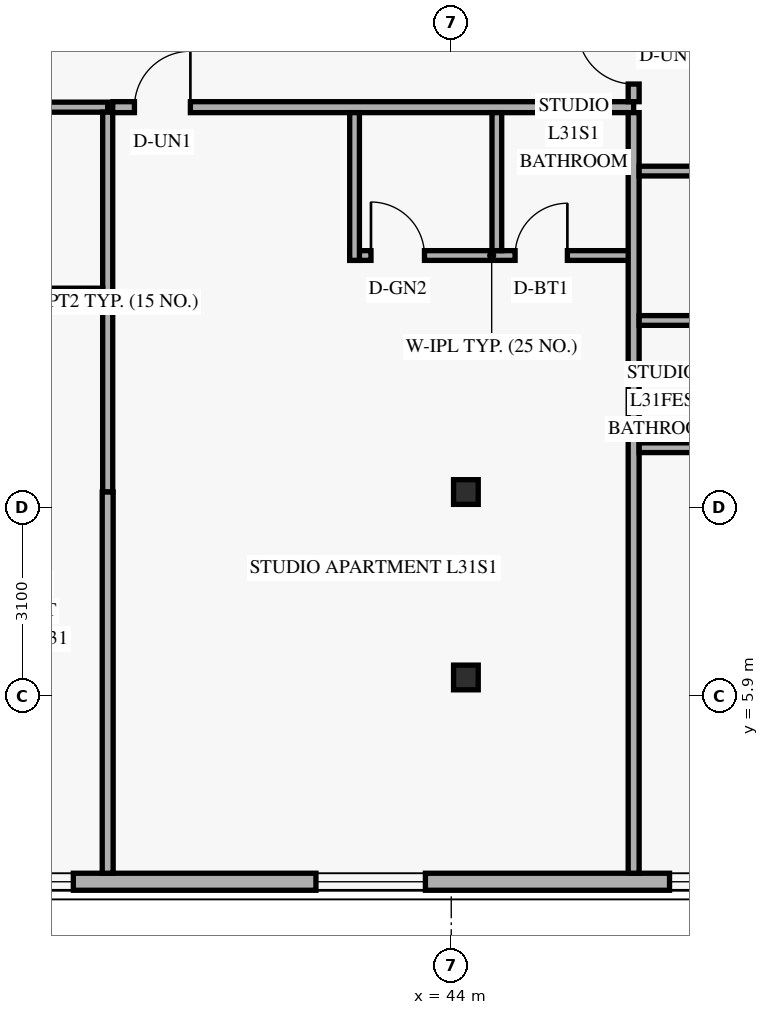
"""IFC4 building model, lengths in metres.
Left out: names, types, materials, properties, quantities, classifications, styles, units other than length and angle.
Written with IfcOpenShell. Run it as: python <this file> out.ifc"""

import sys

from ifc_helpers import new_model, si_unit, direction, frame, frame_2d, origin, origin_2d, place, context, subcontext, project, spatial, rectangle, hollow_rectangle, extrude, element, fill, save


model = new_model("IFC4")
c1 = context("Model", 3, precision=1e-05, world=origin(), true_north=direction((0.0, 1.0)))
c2 = subcontext(c1, "Body", "Model", "MODEL_VIEW")
j1 = project(units=[si_unit("LENGTHUNIT", "METRE"), si_unit("PLANEANGLEUNIT", "RADIAN")], contexts=[c1])
p1 = place(None, origin())
s1 = spatial("IfcSite", under=j1, at=p1, CompositionType="ELEMENT")
p2 = place(p1, origin())
s2 = spatial("IfcBuilding", under=s1, at=p2, CompositionType="ELEMENT")
p3 = place(p2, frame((0.0, 0.0, 121.2)))
s3 = spatial("IfcBuildingStorey", under=s2, at=p3, CompositionType="ELEMENT", Elevation=121.2)
for number, where, z_axis, x_axis in (
    (1, (44.178, 6.2, 0.0), (0.035, 0.0, 0.999), (0.0, 1.0, 0.0)),
    (2, (44.178, 9.25, 0.0), (0.035, 0.0, 0.999), (0.0, 1.0, 0.0)),
):
    element("IfcColumn", number, at=place(p3, frame(where, z_axis=z_axis, x_axis=x_axis)), inside=s3, PredefinedType="COLUMN", context=c2, shape_type="SweptSolid", body=[
        extrude(hollow_rectangle(XDim=0.406, YDim=0.406, WallThickness=0.016, at=origin_2d()), origin(), (0.0, 0.0, 1.0), 3.602),
    ])
p4 = place(p3, frame((13.42, 2.84, 0.0), z_axis=(0.0, 0.0, 1.0), x_axis=(1.0, 0.0, 0.0)))
e3 = element("IfcWall", 3, at=p4, inside=s3, PredefinedType="SOLIDWALL", context=c2, shape_type="SweptSolid", body=[
    extrude(rectangle(XDim=36.56, YDim=0.28, at=frame_2d((18.28, 0.0))), origin(), (0.0, 0.0, 1.0), 3.36),
])
p5 = place(p4, frame((3.215, 0.0, 0.85)))
e4 = element("IfcOpeningElement", 4, at=p5, cuts=e3, PredefinedType="OPENING", context=c2, shape_type="SweptSolid", body=[
    extrude(rectangle(XDim=1.8, YDim=1.6, at=frame_2d((0.9, 0.8))), frame((0.0, 0.15, 0.0), z_axis=(0.0, -1.0, 0.0), x_axis=(1.0, 0.0, 0.0)), (0.0, 0.0, 1.0), 0.3),
])
p6 = place(p4, frame((10.405, 0.0, 0.85)))
e5 = element("IfcOpeningElement", 5, at=p6, cuts=e3, PredefinedType="OPENING", context=c2, shape_type="SweptSolid", body=[
    extrude(rectangle(XDim=1.8, YDim=1.6, at=frame_2d((0.9, 0.8))), frame((0.0, 0.15, 0.0), z_axis=(0.0, -1.0, 0.0), x_axis=(1.0, 0.0, 0.0)), (0.0, 0.0, 1.0), 0.3),
])
p7 = place(p4, frame((17.29, 0.0, 0.85)))
e6 = element("IfcOpeningElement", 6, at=p7, cuts=e3, PredefinedType="OPENING", context=c2, shape_type="SweptSolid", body=[
    extrude(rectangle(XDim=1.8, YDim=1.6, at=frame_2d((0.9, 0.8))), frame((0.0, 0.15, 0.0), z_axis=(0.0, -1.0, 0.0), x_axis=(1.0, 0.0, 0.0)), (0.0, 0.0, 1.0), 0.3),
])
p8 = place(p4, frame((22.565, 0.0, 0.85)))
e7 = element("IfcOpeningElement", 7, at=p8, cuts=e3, PredefinedType="OPENING", context=c2, shape_type="SweptSolid", body=[
    extrude(rectangle(XDim=1.8, YDim=1.6, at=frame_2d((0.9, 0.8))), frame((0.0, 0.15, 0.0), z_axis=(0.0, -1.0, 0.0), x_axis=(1.0, 0.0, 0.0)), (0.0, 0.0, 1.0), 0.3),
])
p9 = place(p4, frame((28.355, 0.0, 0.85)))
e8 = element("IfcOpeningElement", 8, at=p9, cuts=e3, PredefinedType="OPENING", context=c2, shape_type="SweptSolid", body=[
    extrude(rectangle(XDim=1.8, YDim=1.6, at=frame_2d((0.9, 0.8))), frame((0.0, 0.15, 0.0), z_axis=(0.0, -1.0, 0.0), x_axis=(1.0, 0.0, 0.0)), (0.0, 0.0, 1.0), 0.3),
])
p10 = place(p4, frame((34.17, 0.0, 0.85)))
e9 = element("IfcOpeningElement", 9, at=p10, cuts=e3, PredefinedType="OPENING", context=c2, shape_type="SweptSolid", body=[
    extrude(rectangle(XDim=1.8, YDim=1.6, at=frame_2d((0.9, 0.8))), frame((0.0, 0.15, 0.0), z_axis=(0.0, -1.0, 0.0), x_axis=(1.0, 0.0, 0.0)), (0.0, 0.0, 1.0), 0.3),
])
p11 = place(p3, frame((32.732, 15.58, 0.0), z_axis=(0.0, 0.0, 1.0), x_axis=(1.0, 0.0, 0.0)))
e10 = element("IfcWall", 10, at=p11, inside=s3, PredefinedType="PARTITIONING", context=c2, shape_type="SweptSolid", body=[
    extrude(rectangle(XDim=5.618, YDim=0.165, at=frame_2d((2.809, 0.0))), origin(), (0.0, 0.0, 1.0), 2.731),
])
p12 = place(p11, frame((2.867, 0.0, 0.0)))
e11 = element("IfcOpeningElement", 11, at=p12, cuts=e10, PredefinedType="OPENING", context=c2, shape_type="SweptSolid", body=[
    extrude(rectangle(XDim=0.95, YDim=2.15, at=frame_2d((0.475, 1.075))), frame((0.0, 0.093, 0.0), z_axis=(0.0, -1.0, 0.0), x_axis=(1.0, 0.0, 0.0)), (0.0, 0.0, 1.0), 0.185),
])
p13 = place(p3, frame((38.35, 9.25, 0.0), z_axis=(0.0, 0.0, 1.0), x_axis=(0.0, 1.0, 0.0)))
e12 = element("IfcWall", 12, at=p13, inside=s3, PredefinedType="PARTITIONING", context=c2, shape_type="SweptSolid", body=[
    extrude(rectangle(XDim=6.248, YDim=0.165, at=frame_2d((3.124, 0.0))), origin(), (0.0, 0.0, 1.0), 2.731),
])
p14 = place(p3, frame((32.732, 12.52, 0.0), z_axis=(0.0, 0.0, 1.0), x_axis=(1.0, 0.0, 0.0)))
e13 = element("IfcWall", 13, at=p14, inside=s3, PredefinedType="PARTITIONING", context=c2, shape_type="SweptSolid", body=[
    extrude(rectangle(XDim=5.535, YDim=0.165, at=frame_2d((2.768, 0.0))), origin(), (0.0, 0.0, 1.0), 2.731),
])
p15 = place(p14, frame((2.768, 0.0, 0.0)))
e14 = element("IfcOpeningElement", 14, at=p15, cuts=e13, PredefinedType="OPENING", context=c2, shape_type="SweptSolid", body=[
    extrude(rectangle(XDim=0.9, YDim=2.1, at=frame_2d((0.45, 1.05))), frame((0.0, 0.093, 0.0), z_axis=(0.0, -1.0, 0.0), x_axis=(1.0, 0.0, 0.0)), (0.0, 0.0, 1.0), 0.185),
])
p16 = place(p3, frame((38.433, 15.58, 0.0), z_axis=(0.0, 0.0, 1.0), x_axis=(1.0, 0.0, 0.0)))
e15 = element("IfcWall", 15, at=p16, inside=s3, PredefinedType="STANDARD", context=c2, shape_type="SweptSolid", body=[
    extrude(rectangle(XDim=8.567, YDim=0.18, at=frame_2d((4.284, 0.0))), origin(), (0.0, 0.0, 1.0), 2.731),
])
p17 = place(p16, frame((0.357, 0.0, 0.0)))
e16 = element("IfcOpeningElement", 16, at=p17, cuts=e15, PredefinedType="OPENING", context=c2, shape_type="SweptSolid", body=[
    extrude(rectangle(XDim=0.92, YDim=2.15, at=frame_2d((0.46, 1.075))), frame((0.0, 0.1, 0.0), z_axis=(0.0, -1.0, 0.0), x_axis=(1.0, 0.0, 0.0)), (0.0, 0.0, 1.0), 0.2),
])
p18 = place(p3, frame((38.35, 2.98, 0.0), z_axis=(0.0, 0.0, 1.0), x_axis=(0.0, 1.0, 0.0)))
e17 = element("IfcWall", 17, at=p18, inside=s3, PredefinedType="PARTITIONING", context=c2, shape_type="SweptSolid", body=[
    extrude(rectangle(XDim=6.27, YDim=0.18, at=frame_2d((3.135, 0.0))), origin(), (0.0, 0.0, 1.0), 2.731),
])
p19 = place(p3, frame((42.33, 13.14, 0.0), z_axis=(0.0, 0.0, 1.0), x_axis=(1.0, 0.0, 0.0)))
e18 = element("IfcWall", 18, at=p19, inside=s3, PredefinedType="PLUMBINGWALL", context=c2, shape_type="SweptSolid", body=[
    extrude(rectangle(XDim=4.67, YDim=0.16, at=frame_2d((2.335, 0.0))), origin(), (0.0, 0.0, 1.0), 2.731),
])
p20 = place(p19, frame((0.35, 0.0, 0.0)))
e19 = element("IfcOpeningElement", 19, at=p20, cuts=e18, PredefinedType="OPENING", context=c2, shape_type="SweptSolid", body=[
    extrude(rectangle(XDim=0.88, YDim=2.12, at=frame_2d((0.44, 1.06))), frame((0.0, 0.09, 0.0), z_axis=(0.0, -1.0, 0.0), x_axis=(1.0, 0.0, 0.0)), (0.0, 0.0, 1.0), 0.18),
])
p21 = place(p19, frame((2.72, 0.0, 0.0)))
e20 = element("IfcOpeningElement", 20, at=p21, cuts=e18, PredefinedType="OPENING", context=c2, shape_type="SweptSolid", body=[
    extrude(rectangle(XDim=0.86, YDim=2.12, at=frame_2d((0.43, 1.06))), frame((0.0, 0.09, 0.0), z_axis=(0.0, -1.0, 0.0), x_axis=(1.0, 0.0, 0.0)), (0.0, 0.0, 1.0), 0.18),
])
p22 = place(p3, frame((42.41, 13.06, 0.0), z_axis=(0.0, 0.0, 1.0), x_axis=(0.0, 1.0, 0.0)))
e21 = element("IfcWall", 21, at=p22, inside=s3, PredefinedType="PLUMBINGWALL", context=c2, shape_type="SweptSolid", body=[
    extrude(rectangle(XDim=2.43, YDim=0.16, at=frame_2d((1.215, 0.0))), origin(), (0.0, 0.0, 1.0), 2.988),
])
p23 = place(p3, frame((44.75, 13.22, 0.0), z_axis=(0.0, 0.0, 1.0), x_axis=(0.0, 1.0, 0.0)))
e22 = element("IfcWall", 22, at=p23, inside=s3, PredefinedType="PLUMBINGWALL", context=c2, shape_type="SweptSolid", body=[
    extrude(rectangle(XDim=2.27, YDim=0.16, at=frame_2d((1.135, 0.0))), origin(), (0.0, 0.0, 1.0), 2.988),
])
p24 = place(p3, frame((47.0, 15.67, 0.0), z_axis=(0.0, 0.0, 1.0), x_axis=(0.0, 1.0, 0.0)))
e23 = element("IfcWall", 23, at=p24, inside=s3, PredefinedType="STANDARD", context=c2, shape_type="SweptSolid", body=[
    extrude(rectangle(XDim=1.52, YDim=0.18, at=frame_2d((0.76, 0.0))), origin(), (0.0, 0.0, 1.0), 3.36),
])
p25 = place(p24, frame((0.29, 0.0, 0.0)))
e24 = element("IfcOpeningElement", 24, at=p25, cuts=e23, PredefinedType="OPENING", context=c2, shape_type="SweptSolid", body=[
    extrude(rectangle(XDim=0.92, YDim=2.15, at=frame_2d((0.46, 1.075))), frame((0.0, 0.1, 0.0), z_axis=(0.0, -1.0, 0.0), x_axis=(1.0, 0.0, 0.0)), (0.0, 0.0, 1.0), 0.2),
])
p26 = place(p3, frame((47.0, 2.98, 0.0), z_axis=(0.0, 0.0, 1.0), x_axis=(0.0, 1.0, 0.0)))
e25 = element("IfcWall", 25, at=p26, inside=s3, PredefinedType="PARTITIONING", context=c2, shape_type="SweptSolid", body=[
    extrude(rectangle(XDim=12.51, YDim=0.18, at=frame_2d((6.255, 0.0))), origin(), (0.0, 0.0, 1.0), 2.731),
])
for number, where, z_axis, x_axis in (
    (26, (47.09, 9.979, 0.0), (0.0, 0.0, 1.0), (1.0, 0.0, 0.0)),
    (27, (47.09, 14.529, 0.0), (0.0, 0.0, 1.0), (1.0, 0.0, 0.0)),
):
    element("IfcWall", number, at=place(p3, frame(where, z_axis=z_axis, x_axis=x_axis)), inside=s3, PredefinedType="PLUMBINGWALL", context=c2, shape_type="SweptSolid", body=[
        extrude(rectangle(XDim=2.53, YDim=0.16, at=frame_2d((1.265, 0.0))), origin(), (0.0, 0.0, 1.0), 3.36),
    ])
p27 = place(p3, frame((47.09, 12.072, 0.0), z_axis=(0.0, 0.0, 1.0), x_axis=(1.0, 0.0, 0.0)))
e28 = element("IfcWall", 28, at=p27, inside=s3, PredefinedType="PLUMBINGWALL", context=c2, shape_type="SweptSolid", body=[
    extrude(rectangle(XDim=2.37, YDim=0.16, at=frame_2d((1.185, 0.0))), origin(), (0.0, 0.0, 1.0), 3.36),
])
p28 = place(p8, origin())
e29 = element("IfcWindow", 29, at=p28, inside=s3, PartitioningType="SINGLE_PANEL", PredefinedType="WINDOW", context=c2, shape_type="SweptSolid", body=[
    extrude(rectangle(XDim=1.8, YDim=1.6, at=frame_2d((0.9, 0.8))), frame((0.0, 0.03, 0.0), z_axis=(0.0, -1.0, 0.0), x_axis=(1.0, 0.0, 0.0)), (0.0, 0.0, 1.0), 0.06),
])
fill(e7, e29)
p29 = place(p9, origin())
e30 = element("IfcWindow", 30, at=p29, inside=s3, PartitioningType="SINGLE_PANEL", PredefinedType="WINDOW", context=c2, shape_type="SweptSolid", body=[
    extrude(rectangle(XDim=1.8, YDim=1.6, at=frame_2d((0.9, 0.8))), frame((0.0, 0.03, 0.0), z_axis=(0.0, -1.0, 0.0), x_axis=(1.0, 0.0, 0.0)), (0.0, 0.0, 1.0), 0.06),
])
fill(e8, e30)
p30 = place(p10, origin())
e31 = element("IfcWindow", 31, at=p30, inside=s3, PartitioningType="SINGLE_PANEL", PredefinedType="WINDOW", context=c2, shape_type="SweptSolid", body=[
    extrude(rectangle(XDim=1.8, YDim=1.6, at=frame_2d((0.9, 0.8))), frame((0.0, 0.03, 0.0), z_axis=(0.0, -1.0, 0.0), x_axis=(1.0, 0.0, 0.0)), (0.0, 0.0, 1.0), 0.06),
])
fill(e9, e31)
p31 = place(p17, origin())
e32 = element("IfcDoor", 32, at=p31, inside=s3, OperationType="SINGLE_SWING_RIGHT", PredefinedType="DOOR", context=c2, shape_type="SweptSolid", body=[
    extrude(rectangle(XDim=0.92, YDim=2.15, at=frame_2d((0.46, 1.075))), frame((0.0, 0.025, 0.0), z_axis=(0.0, -1.0, 0.0), x_axis=(1.0, 0.0, 0.0)), (0.0, 0.0, 1.0), 0.05),
])
fill(e16, e32)
p32 = place(p20, origin())
e33 = element("IfcDoor", 33, at=p32, inside=s3, OperationType="SINGLE_SWING_LEFT", PredefinedType="DOOR", context=c2, shape_type="SweptSolid", body=[
    extrude(rectangle(XDim=0.88, YDim=2.12, at=frame_2d((0.44, 1.06))), frame((0.0, 0.025, 0.0), z_axis=(0.0, -1.0, 0.0), x_axis=(1.0, 0.0, 0.0)), (0.0, 0.0, 1.0), 0.05),
])
fill(e19, e33)
p33 = place(p21, origin())
e34 = element("IfcDoor", 34, at=p33, inside=s3, OperationType="SINGLE_SWING_RIGHT", PredefinedType="DOOR", context=c2, shape_type="SweptSolid", body=[
    extrude(rectangle(XDim=0.86, YDim=2.12, at=frame_2d((0.43, 1.06))), frame((0.0, 0.025, 0.0), z_axis=(0.0, -1.0, 0.0), x_axis=(1.0, 0.0, 0.0)), (0.0, 0.0, 1.0), 0.05),
])
fill(e20, e34)
p34 = place(p25, origin())
e35 = element("IfcDoor", 35, at=p34, inside=s3, OperationType="SINGLE_SWING_RIGHT", PredefinedType="DOOR", context=c2, shape_type="SweptSolid", body=[
    extrude(rectangle(XDim=0.92, YDim=2.15, at=frame_2d((0.46, 1.075))), frame((0.0, 0.025, 0.0), z_axis=(0.0, -1.0, 0.0), x_axis=(1.0, 0.0, 0.0)), (0.0, 0.0, 1.0), 0.05),
])
fill(e24, e35)
save(model, sys.argv[1])
